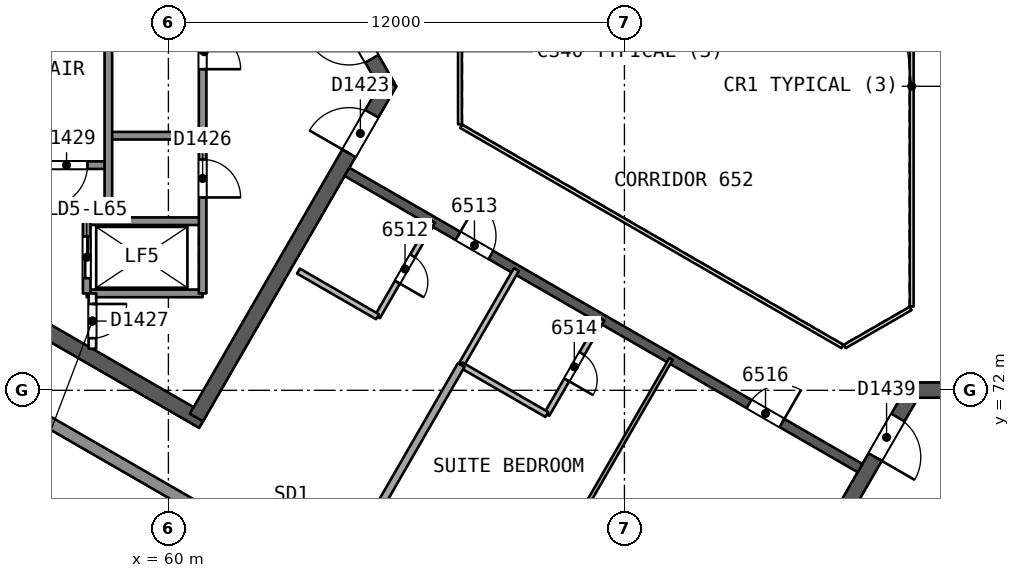
"""IFC4 building model, lengths in metres.
Left out: names, types, materials, properties, quantities, classifications, styles, units other than length and angle.
Written with IfcOpenShell. Run it as: python <this file> out.ifc"""

import sys

from ifc_helpers import new_model, si_unit, direction, frame, frame_2d, origin, place, context, subcontext, project, spatial, rectangle, extrude, element, fill, save


model = new_model("IFC4")
c1 = context("Model", 3, precision=1e-05, world=origin(), true_north=direction((0.0, 1.0)))
c2 = subcontext(c1, "Body", "Model", "MODEL_VIEW")
j1 = project(units=[si_unit("LENGTHUNIT", "METRE"), si_unit("PLANEANGLEUNIT", "RADIAN")], contexts=[c1])
p1 = place(None, origin())
s1 = spatial("IfcSite", under=j1, at=p1, CompositionType="ELEMENT")
p2 = place(p1, origin())
s2 = spatial("IfcBuilding", under=s1, at=p2, CompositionType="ELEMENT")
p3 = place(p2, frame((0.0, 0.0, 266.4)))
s3 = spatial("IfcBuildingStorey", under=s2, at=p3, CompositionType="ELEMENT", Elevation=266.4)
p4 = place(p3, frame((65.769, 80.0, 0.0), z_axis=(0.0, 0.0, 1.0), x_axis=(-0.50000177223, 0.866024380585, 0.0)))
e1 = element("IfcWall", 1, at=p4, inside=s3, PredefinedType="SHEAR", context=c2, shape_type="SweptSolid", body=[
    extrude(rectangle(XDim=10.265, YDim=0.4, at=frame_2d((5.132, 0.0))), origin(), (0.0, 0.0, 1.0), 3.7),
])
p5 = place(p4, frame((0.834, 0.0, 0.0)))
e2 = element("IfcOpeningElement", 2, at=p5, cuts=e1, PredefinedType="OPENING", context=c2, shape_type="SweptSolid", body=[
    extrude(rectangle(XDim=1.2, YDim=2.1, at=frame_2d((0.6, 1.05))), frame((0.0, 0.21, 0.0), z_axis=(0.0, -1.0, 0.0), x_axis=(1.0, 0.0, 0.0)), (0.0, 0.0, 1.0), 0.421),
])
p6 = place(p3, frame((48.597, 78.293, 0.0), z_axis=(0.0, 0.0, 1.0), x_axis=(0.866026024469, -0.499998924941, 0.0)))
e3 = element("IfcWall", 3, at=p6, inside=s3, PredefinedType="SHEAR", context=c2, shape_type="SweptSolid", body=[
    extrude(rectangle(XDim=14.218, YDim=0.4, at=frame_2d((7.109, 0.0))), origin(), (0.0, 0.0, 1.0), 3.7),
])
p7 = place(p3, frame((60.737, 71.284, 0.0), z_axis=(0.0, 0.0, 1.0), x_axis=(0.50000547566, 0.866022242388, 0.0)))
e4 = element("IfcWall", 4, at=p7, inside=s3, PredefinedType="SHEAR", context=c2, shape_type="SweptSolid", body=[
    extrude(rectangle(XDim=10.18, YDim=0.4, at=frame_2d((5.09, 0.0))), origin(), (0.0, 0.0, 1.0), 3.7),
])
p8 = place(p7, frame((8.03, 0.0, 0.0)))
e5 = element("IfcOpeningElement", 5, at=p8, cuts=e4, PredefinedType="OPENING", context=c2, shape_type="SweptSolid", body=[
    extrude(rectangle(XDim=1.2, YDim=2.1, at=frame_2d((0.6, 1.05))), frame((0.0, 0.21, 0.0), z_axis=(0.0, -1.0, 0.0), x_axis=(1.0, 0.0, 0.0)), (0.0, 0.0, 1.0), 0.421),
])
p9 = place(p3, frame((79.615, 72.006, 0.0), z_axis=(0.0, 0.0, 1.0), x_axis=(-0.50000177223, -0.866024380585, 0.0)))
e6 = element("IfcWall", 6, at=p9, inside=s3, PredefinedType="SHEAR", context=c2, shape_type="SweptSolid", body=[
    extrude(rectangle(XDim=10.265, YDim=0.4, at=frame_2d((5.132, 0.0))), origin(), (0.0, 0.0, 1.0), 3.7),
])
p10 = place(p9, frame((0.834, 0.0, 0.0)))
e7 = element("IfcOpeningElement", 7, at=p10, cuts=e6, PredefinedType="OPENING", context=c2, shape_type="SweptSolid", body=[
    extrude(rectangle(XDim=1.2, YDim=2.1, at=frame_2d((0.6, 1.05))), frame((0.0, 0.21, 0.0), z_axis=(0.0, -1.0, 0.0), x_axis=(1.0, 0.0, 0.0)), (0.0, 0.0, 1.0), 0.421),
])
p11 = place(p3, frame((89.68, 72.006, 0.0), z_axis=(0.0, 0.0, 1.0), x_axis=(-1.0, 0.0, 0.0)))
e8 = element("IfcWall", 8, at=p11, inside=s3, PredefinedType="SHEAR", context=c2, shape_type="SweptSolid", body=[
    extrude(rectangle(XDim=10.18, YDim=0.4, at=frame_2d((5.09, 0.0))), origin(), (0.0, 0.0, 1.0), 3.7),
])
p12 = place(p11, frame((8.03, 0.0, 0.0)))
e9 = element("IfcOpeningElement", 9, at=p12, cuts=e8, PredefinedType="OPENING", context=c2, shape_type="SweptSolid", body=[
    extrude(rectangle(XDim=1.2, YDim=2.1, at=frame_2d((0.6, 1.05))), frame((0.0, 0.21, 0.0), z_axis=(0.0, -1.0, 0.0), x_axis=(1.0, 0.0, 0.0)), (0.0, 0.0, 1.0), 0.421),
])
p13 = place(p3, frame((64.7, 77.748, 0.0), z_axis=(0.0, 0.0, 1.0), x_axis=(0.866026492143, -0.499998114903, 0.0)))
e10 = element("IfcWall", 10, at=p13, inside=s3, PredefinedType="SHEAR", context=c2, shape_type="SweptSolid", body=[
    extrude(rectangle(XDim=15.588, YDim=0.25, at=frame_2d((7.794, 0.0))), origin(), (0.0, 0.0, 1.0), 3.3),
])
p14 = place(p13, frame((3.372, 0.0, 0.0)))
e11 = element("IfcOpeningElement", 11, at=p14, cuts=e10, PredefinedType="OPENING", context=c2, shape_type="SweptSolid", body=[
    extrude(rectangle(XDim=1.0, YDim=2.1, at=frame_2d((0.5, 1.05))), frame((0.0, 0.135, 0.0), z_axis=(0.0, -1.0, 0.0), x_axis=(1.0, 0.0, 0.0)), (0.0, 0.0, 1.0), 0.271),
])
p15 = place(p13, frame((12.216, 0.0, 0.0)))
e12 = element("IfcOpeningElement", 12, at=p15, cuts=e10, PredefinedType="OPENING", context=c2, shape_type="SweptSolid", body=[
    extrude(rectangle(XDim=1.0, YDim=2.1, at=frame_2d((0.5, 1.05))), frame((0.0, 0.135, 0.0), z_axis=(0.0, -1.0, 0.0), x_axis=(1.0, 0.0, 0.0)), (0.0, 0.0, 1.0), 0.271),
])
p16 = place(p3, frame((66.952, 76.448, 0.0), z_axis=(0.0, 0.0, 1.0), x_axis=(-0.499987231761, -0.866032775405, 0.0)))
e13 = element("IfcWall", 13, at=p16, inside=s3, PredefinedType="PARTITIONING", context=c2, shape_type="SweptSolid", body=[
    extrude(rectangle(XDim=2.9, YDim=0.15, at=frame_2d((1.45, 0.0))), origin(), (0.0, 0.0, 1.0), 3.3),
])
p17 = place(p16, frame((1.05, 0.0, 0.0)))
e14 = element("IfcOpeningElement", 14, at=p17, cuts=e13, PredefinedType="OPENING", context=c2, shape_type="SweptSolid", body=[
    extrude(rectangle(XDim=0.8, YDim=2.1, at=frame_2d((0.4, 1.05))), frame((0.0, 0.085, 0.0), z_axis=(0.0, -1.0, 0.0), x_axis=(1.0, 0.0, 0.0)), (0.0, 0.0, 1.0), 0.171),
])
p18 = place(p3, frame((65.502, 73.937, 0.0), z_axis=(0.0, 0.0, 1.0), x_axis=(-0.865994240961, 0.500053971709, 0.0)))
e15 = element("IfcWall", 15, at=p18, inside=s3, PredefinedType="PARTITIONING", context=c2, shape_type="SweptSolid", body=[
    extrude(rectangle(XDim=2.401, YDim=0.15, at=frame_2d((1.201, 0.0))), origin(), (0.0, 0.0, 1.0), 3.3),
])
p19 = place(p3, frame((64.416, 66.968, 0.0), z_axis=(0.0, 0.0, 1.0), x_axis=(0.500014792963, 0.866016862895, 0.0)))
e16 = element("IfcWall", 16, at=p19, inside=s3, PredefinedType="PARTITIONING", context=c2, shape_type="SweptSolid", body=[
    extrude(rectangle(XDim=6.578, YDim=0.2, at=frame_2d((3.289, 0.0))), origin(), (0.0, 0.0, 1.0), 3.3),
])
p20 = place(p3, frame((67.705, 72.665, 0.0), z_axis=(0.0, 0.0, 1.0), x_axis=(0.499987231761, 0.866032775405, 0.0)))
e17 = element("IfcWall", 17, at=p20, inside=s3, PredefinedType="PARTITIONING", context=c2, shape_type="SweptSolid", body=[
    extrude(rectangle(XDim=2.9, YDim=0.15, at=frame_2d((1.45, 0.0))), origin(), (0.0, 0.0, 1.0), 3.3),
])
p21 = place(p3, frame((68.486, 64.618, 0.0), z_axis=(0.0, 0.0, 1.0), x_axis=(0.500017514154, 0.866015291747, 0.0)))
e18 = element("IfcWall", 18, at=p21, inside=s3, PredefinedType="PARTITIONING", context=c2, shape_type="SweptSolid", body=[
    extrude(rectangle(XDim=9.478, YDim=0.1, at=frame_2d((4.739, 0.0))), origin(), (0.0, 0.0, 1.0), 3.3),
])
p22 = place(p21, frame((2.69, 0.0, 0.0)))
e19 = element("IfcOpeningElement", 19, at=p22, cuts=e18, PredefinedType="OPENING", context=c2, shape_type="SweptSolid", body=[
    extrude(rectangle(XDim=0.9, YDim=2.1, at=frame_2d((0.45, 1.05))), frame((0.0, 0.061, 0.0), z_axis=(0.0, -1.0, 0.0), x_axis=(1.0, 0.0, 0.0)), (0.0, 0.0, 1.0), 0.121),
])
p23 = place(p3, frame((71.407, 73.876, 0.0), z_axis=(0.0, 0.0, 1.0), x_axis=(-0.499987231761, -0.866032775405, 0.0)))
e20 = element("IfcWall", 20, at=p23, inside=s3, PredefinedType="PARTITIONING", context=c2, shape_type="SweptSolid", body=[
    extrude(rectangle(XDim=2.9, YDim=0.15, at=frame_2d((1.45, 0.0))), origin(), (0.0, 0.0, 1.0), 3.3),
])
p24 = place(p23, frame((1.05, 0.0, 0.0)))
e21 = element("IfcOpeningElement", 21, at=p24, cuts=e20, PredefinedType="OPENING", context=c2, shape_type="SweptSolid", body=[
    extrude(rectangle(XDim=0.8, YDim=2.1, at=frame_2d((0.4, 1.05))), frame((0.0, 0.085, 0.0), z_axis=(0.0, -1.0, 0.0), x_axis=(1.0, 0.0, 0.0)), (0.0, 0.0, 1.0), 0.171),
])
p25 = place(p3, frame((69.957, 71.365, 0.0), z_axis=(0.0, 0.0, 1.0), x_axis=(-0.866021400173, 0.500006934395, 0.0)))
e22 = element("IfcWall", 22, at=p25, inside=s3, PredefinedType="PARTITIONING", context=c2, shape_type="SweptSolid", body=[
    extrude(rectangle(XDim=2.6, YDim=0.15, at=frame_2d((1.3, 0.0))), origin(), (0.0, 0.0, 1.0), 3.3),
])
p26 = place(p3, frame((87.466, 53.488, 0.0), z_axis=(0.0, 0.0, 1.0), x_axis=(-0.866024833565, 0.500000987648, 0.0)))
e23 = element("IfcWall", 23, at=p26, inside=s3, PredefinedType="SOLIDWALL", context=c2, shape_type="SweptSolid", body=[
    extrude(rectangle(XDim=48.104, YDim=0.3, at=frame_2d((24.052, 0.0))), origin(), (0.0, 0.0, 1.0), 3.3),
])
p27 = place(p26, frame((23.152, 0.0, 0.0)))
e24 = element("IfcOpeningElement", 24, at=p27, cuts=e23, PredefinedType="OPENING", context=c2, shape_type="SweptSolid", body=[
    extrude(rectangle(XDim=2.4, YDim=2.4, at=frame_2d((1.2, 1.2))), frame((0.0, 0.161, 0.0), z_axis=(0.0, -1.0, 0.0), x_axis=(1.0, 0.0, 0.0)), (0.0, 0.0, 1.0), 0.321),
])
p28 = place(p26, frame((17.93, 0.0, 0.0)))
e25 = element("IfcOpeningElement", 25, at=p28, cuts=e23, PredefinedType="OPENING", context=c2, shape_type="SweptSolid", body=[
    extrude(rectangle(XDim=2.4, YDim=2.4, at=frame_2d((1.2, 1.2))), frame((0.0, 0.161, 0.0), z_axis=(0.0, -1.0, 0.0), x_axis=(1.0, 0.0, 0.0)), (0.0, 0.0, 1.0), 0.321),
])
p29 = place(p26, frame((28.074, 0.0, 0.0)))
e26 = element("IfcOpeningElement", 26, at=p29, cuts=e23, PredefinedType="OPENING", context=c2, shape_type="SweptSolid", body=[
    extrude(rectangle(XDim=2.4, YDim=2.4, at=frame_2d((1.2, 1.2))), frame((0.0, 0.161, 0.0), z_axis=(0.0, -1.0, 0.0), x_axis=(1.0, 0.0, 0.0)), (0.0, 0.0, 1.0), 0.321),
])
p30 = place(p3, frame((60.9, 78.7, 0.0), z_axis=(0.0, 0.0, 1.0), x_axis=(-1.0, 0.0, 0.0)))
e27 = element("IfcWall", 27, at=p30, inside=s3, PredefinedType="SOLIDWALL", context=c2, shape_type="SweptSolid", body=[
    extrude(rectangle(XDim=2.48, YDim=0.2, at=frame_2d((1.24, 0.0))), origin(), (0.0, 0.0, 1.0), 3.3),
])
p31 = place(p3, frame((58.42, 77.925, 0.0), z_axis=(0.0, 0.0, 1.0), x_axis=(-1.0, 0.0, 0.0)))
e28 = element("IfcWall", 28, at=p31, inside=s3, PredefinedType="SOLIDWALL", context=c2, shape_type="SweptSolid", body=[
    extrude(rectangle(XDim=7.7, YDim=0.2, at=frame_2d((3.85, 0.0))), origin(), (0.0, 0.0, 1.0), 3.3),
])
p32 = place(p31, frame((0.55, 0.0, 0.0)))
e29 = element("IfcOpeningElement", 29, at=p32, cuts=e28, PredefinedType="OPENING", context=c2, shape_type="SweptSolid", body=[
    extrude(rectangle(XDim=1.1, YDim=2.1, at=frame_2d((0.55, 1.05))), frame((0.0, 0.11, 0.0), z_axis=(0.0, -1.0, 0.0), x_axis=(1.0, 0.0, 0.0)), (0.0, 0.0, 1.0), 0.221),
])
for number, where, z_axis, x_axis in (
    (30, (60.9, 76.45, 0.0), (0.0, 0.0, 1.0), (-1.0, 0.0, 0.0)),
    (31, (60.9, 74.55, 0.0), (0.0, 0.0, 1.0), (-1.0, 0.0, 0.0)),
):
    element("IfcWall", number, at=place(p3, frame(where, z_axis=z_axis, x_axis=x_axis)), inside=s3, PredefinedType="SOLIDWALL", context=c2, shape_type="SweptSolid", body=[
        extrude(rectangle(XDim=3.05, YDim=0.2, at=frame_2d((1.525, 0.0))), origin(), (0.0, 0.0, 1.0), 3.3),
    ])
p33 = place(p3, frame((60.9, 85.45, 0.0), z_axis=(0.0, 0.0, 1.0), x_axis=(0.0, -1.0, 0.0)))
e32 = element("IfcWall", 32, at=p33, inside=s3, PredefinedType="SOLIDWALL", context=c2, shape_type="SweptSolid", body=[
    extrude(rectangle(XDim=10.9, YDim=0.2, at=frame_2d((5.45, 0.0))), origin(), (0.0, 0.0, 1.0), 3.3),
])
p34 = place(p33, frame((0.625, 0.0, 0.0)))
e33 = element("IfcOpeningElement", 33, at=p34, cuts=e32, PredefinedType="OPENING", context=c2, shape_type="SweptSolid", body=[
    extrude(rectangle(XDim=1.0, YDim=2.1, at=frame_2d((0.5, 1.05))), frame((0.0, 0.11, 0.0), z_axis=(0.0, -1.0, 0.0), x_axis=(1.0, 0.0, 0.0)), (0.0, 0.0, 1.0), 0.221),
])
p35 = place(p33, frame((4.0, 0.0, 0.0)))
e34 = element("IfcOpeningElement", 34, at=p35, cuts=e32, PredefinedType="OPENING", context=c2, shape_type="SweptSolid", body=[
    extrude(rectangle(XDim=1.0, YDim=2.1, at=frame_2d((0.5, 1.05))), frame((0.0, 0.11, 0.0), z_axis=(0.0, -1.0, 0.0), x_axis=(1.0, 0.0, 0.0)), (0.0, 0.0, 1.0), 0.221),
])
p36 = place(p33, frame((7.375, 0.0, 0.0)))
e35 = element("IfcOpeningElement", 35, at=p36, cuts=e32, PredefinedType="OPENING", context=c2, shape_type="SweptSolid", body=[
    extrude(rectangle(XDim=1.0, YDim=2.1, at=frame_2d((0.5, 1.05))), frame((0.0, 0.11, 0.0), z_axis=(0.0, -1.0, 0.0), x_axis=(1.0, 0.0, 0.0)), (0.0, 0.0, 1.0), 0.221),
])
p37 = place(p3, frame((58.42, 87.148, 0.0), z_axis=(0.0, 0.0, 1.0), x_axis=(0.0, -1.0, 0.0)))
e36 = element("IfcWall", 36, at=p37, inside=s3, PredefinedType="SOLIDWALL", context=c2, shape_type="SweptSolid", body=[
    extrude(rectangle(XDim=10.698, YDim=0.2, at=frame_2d((5.349, 0.0))), origin(), (0.0, 0.0, 1.0), 3.3),
])
p38 = place(p37, frame((0.399, 0.0, 0.0)))
e37 = element("IfcOpeningElement", 37, at=p38, cuts=e36, PredefinedType="OPENING", context=c2, shape_type="SweptSolid", body=[
    extrude(rectangle(XDim=0.9, YDim=2.1, at=frame_2d((0.45, 1.05))), frame((0.0, 0.11, 0.0), z_axis=(0.0, -1.0, 0.0), x_axis=(1.0, 0.0, 0.0)), (0.0, 0.0, 1.0), 0.221),
])
p39 = place(p3, frame((58.0, 74.55, 0.0), z_axis=(0.0, 0.0, 1.0), x_axis=(0.0, -1.0, 0.0)))
e38 = element("IfcWall", 38, at=p39, inside=s3, PredefinedType="PARTITIONING", context=c2, shape_type="SweptSolid", body=[
    extrude(rectangle(XDim=1.455, YDim=0.2, at=frame_2d((0.728, 0.0))), origin(), (0.0, 0.0, 1.0), 3.3),
])
p40 = place(p39, frame((0.278, 0.0, 0.0)))
e39 = element("IfcOpeningElement", 39, at=p40, cuts=e38, PredefinedType="OPENING", context=c2, shape_type="SweptSolid", body=[
    extrude(rectangle(XDim=0.9, YDim=2.1, at=frame_2d((0.45, 1.05))), frame((0.0, 0.11, 0.0), z_axis=(0.0, -1.0, 0.0), x_axis=(1.0, 0.0, 0.0)), (0.0, 0.0, 1.0), 0.221),
])
p41 = place(p3, frame((57.85, 76.45, 0.0), z_axis=(0.0, 0.0, 1.0), x_axis=(0.0, -1.0, 0.0)))
e40 = element("IfcWall", 40, at=p41, inside=s3, PredefinedType="SOLIDWALL", context=c2, shape_type="SweptSolid", body=[
    extrude(rectangle(XDim=1.9, YDim=0.2, at=frame_2d((0.95, 0.0))), origin(), (0.0, 0.0, 1.0), 3.3),
])
p42 = place(p41, frame((0.4, 0.0, 0.0)))
e41 = element("IfcOpeningElement", 41, at=p42, cuts=e40, PredefinedType="OPENING", context=c2, shape_type="SweptSolid", body=[
    extrude(rectangle(XDim=1.1, YDim=2.1, at=frame_2d((0.55, 1.05))), frame((0.0, 0.11, 0.0), z_axis=(0.0, -1.0, 0.0), x_axis=(1.0, 0.0, 0.0)), (0.0, 0.0, 1.0), 0.221),
])
p43 = place(p3, frame((77.135, 64.952, 0.0), z_axis=(0.0, 0.0, 1.0), x_axis=(0.866031916153, 0.499988720078, 0.0)))
e42 = element("IfcWall", 42, at=p43, inside=s3, PredefinedType="SOLIDWALL", context=c2, shape_type="SweptSolid", body=[
    extrude(rectangle(XDim=11.35, YDim=0.2, at=frame_2d((5.675, 0.0))), origin(), (0.0, 0.0, 1.0), 3.3),
])
p44 = place(p43, frame((2.875, 0.0, 0.0)))
e43 = element("IfcOpeningElement", 43, at=p44, cuts=e42, PredefinedType="OPENING", context=c2, shape_type="SweptSolid", body=[
    extrude(rectangle(XDim=1.1, YDim=2.1, at=frame_2d((0.55, 1.05))), frame((0.0, 0.11, 0.0), z_axis=(0.0, -1.0, 0.0), x_axis=(1.0, 0.0, 0.0)), (0.0, 0.0, 1.0), 0.221),
])
p45 = place(p43, frame((5.125, 0.0, 0.0)))
e44 = element("IfcOpeningElement", 44, at=p45, cuts=e42, PredefinedType="OPENING", context=c2, shape_type="SweptSolid", body=[
    extrude(rectangle(XDim=1.1, YDim=2.1, at=frame_2d((0.55, 1.05))), frame((0.0, 0.11, 0.0), z_axis=(0.0, -1.0, 0.0), x_axis=(1.0, 0.0, 0.0)), (0.0, 0.0, 1.0), 0.221),
])
p46 = place(p43, frame((7.375, 0.0, 0.0)))
e45 = element("IfcOpeningElement", 45, at=p46, cuts=e42, PredefinedType="OPENING", context=c2, shape_type="SweptSolid", body=[
    extrude(rectangle(XDim=1.1, YDim=2.1, at=frame_2d((0.55, 1.05))), frame((0.0, 0.11, 0.0), z_axis=(0.0, -1.0, 0.0), x_axis=(1.0, 0.0, 0.0)), (0.0, 0.0, 1.0), 0.221),
])
p47 = place(p3, frame((79.56, 74.206, 0.0), z_axis=(0.0, 0.0, 1.0), x_axis=(0.0, 1.0, 0.0)))
e46 = element("IfcWall", 46, at=p47, inside=s3, PredefinedType="PARTITIONING", context=c2, shape_type="SweptSolid", body=[
    extrude(rectangle(XDim=11.588, YDim=0.1, at=frame_2d((5.794, 0.0))), origin(), (0.0, 0.0, 1.0), 3.3),
])
p48 = place(p3, frame((67.672, 81.0, 0.0), z_axis=(0.0, 0.0, 1.0), x_axis=(0.0, -1.0, 0.0)))
e47 = element("IfcWall", 47, at=p48, inside=s3, PredefinedType="PARTITIONING", context=c2, shape_type="SweptSolid", body=[
    extrude(rectangle(XDim=2.0, YDim=0.1, at=frame_2d((1.0, 0.0))), origin(), (0.0, 0.0, 1.0), 3.3),
])
p49 = place(p3, frame((67.702, 78.948, 0.0), z_axis=(0.0, 0.0, 1.0), x_axis=(0.866026658274, -0.499997827154, 0.0)))
e48 = element("IfcWall", 48, at=p49, inside=s3, PredefinedType="PARTITIONING", context=c2, shape_type="SweptSolid", body=[
    extrude(rectangle(XDim=11.588, YDim=0.1, at=frame_2d((5.794, 0.0))), origin(), (0.0, 0.0, 1.0), 3.3),
])
p50 = place(p3, frame((77.798, 73.154, 0.0), z_axis=(0.0, 0.0, 1.0), x_axis=(0.866041268327, 0.499972520799, 0.0)))
e49 = element("IfcWall", 49, at=p50, inside=s3, PredefinedType="PARTITIONING", context=c2, shape_type="SweptSolid", body=[
    extrude(rectangle(XDim=2.0, YDim=0.1, at=frame_2d((1.0, 0.0))), origin(), (0.0, 0.0, 1.0), 3.3),
])
p51 = place(p17, origin())
e50 = element("IfcDoor", 50, at=p51, inside=s3, OperationType="SINGLE_SWING_RIGHT", PredefinedType="NOTDEFINED", context=c2, shape_type="SweptSolid", body=[
    extrude(rectangle(XDim=0.8, YDim=2.1, at=frame_2d((0.4, 1.05))), frame((0.0, 0.025, 0.0), z_axis=(0.0, -1.0, 0.0), x_axis=(1.0, 0.0, 0.0)), (0.0, 0.0, 1.0), 0.05),
])
fill(e14, e50)
p52 = place(p14, origin())
e51 = element("IfcDoor", 51, at=p52, inside=s3, OperationType="SINGLE_SWING_LEFT", PredefinedType="NOTDEFINED", context=c2, shape_type="SweptSolid", body=[
    extrude(rectangle(XDim=1.0, YDim=2.1, at=frame_2d((0.5, 1.05))), frame((0.0, 0.025, 0.0), z_axis=(0.0, -1.0, 0.0), x_axis=(1.0, 0.0, 0.0)), (0.0, 0.0, 1.0), 0.05),
])
fill(e11, e51)
p53 = place(p24, origin())
e52 = element("IfcDoor", 52, at=p53, inside=s3, OperationType="SINGLE_SWING_RIGHT", PredefinedType="NOTDEFINED", context=c2, shape_type="SweptSolid", body=[
    extrude(rectangle(XDim=0.8, YDim=2.1, at=frame_2d((0.4, 1.05))), frame((0.0, 0.025, 0.0), z_axis=(0.0, -1.0, 0.0), x_axis=(1.0, 0.0, 0.0)), (0.0, 0.0, 1.0), 0.05),
])
fill(e21, e52)
p54 = place(p15, origin())
e53 = element("IfcDoor", 53, at=p54, inside=s3, OperationType="SINGLE_SWING_RIGHT", PredefinedType="NOTDEFINED", context=c2, shape_type="SweptSolid", body=[
    extrude(rectangle(XDim=1.0, YDim=2.1, at=frame_2d((0.5, 1.05))), frame((0.0, 0.025, 0.0), z_axis=(0.0, -1.0, 0.0), x_axis=(1.0, 0.0, 0.0)), (0.0, 0.0, 1.0), 0.05),
])
fill(e12, e53)
p55 = place(p5, origin())
e54 = element("IfcDoor", 54, at=p55, inside=s3, OperationType="SINGLE_SWING_RIGHT", PredefinedType="NOTDEFINED", context=c2, shape_type="SweptSolid", body=[
    extrude(rectangle(XDim=1.2, YDim=2.1, at=frame_2d((0.6, 1.05))), frame((0.0, 0.025, 0.0), z_axis=(0.0, -1.0, 0.0), x_axis=(1.0, 0.0, 0.0)), (0.0, 0.0, 1.0), 0.05),
])
fill(e2, e54)
p56 = place(p8, origin())
e55 = element("IfcDoor", 55, at=p56, inside=s3, OperationType="SINGLE_SWING_LEFT", PredefinedType="NOTDEFINED", context=c2, shape_type="SweptSolid", body=[
    extrude(rectangle(XDim=1.2, YDim=2.1, at=frame_2d((0.6, 1.05))), frame((0.0, 0.025, 0.0), z_axis=(0.0, -1.0, 0.0), x_axis=(1.0, 0.0, 0.0)), (0.0, 0.0, 1.0), 0.05),
])
fill(e5, e55)
p57 = place(p42, origin())
e56 = element("IfcDoor", 56, at=p57, inside=s3, OperationType="SLIDING_TO_RIGHT", PredefinedType="NOTDEFINED", context=c2, shape_type="SweptSolid", body=[
    extrude(rectangle(XDim=1.1, YDim=2.1, at=frame_2d((0.55, 1.05))), frame((0.0, 0.025, 0.0), z_axis=(0.0, -1.0, 0.0), x_axis=(1.0, 0.0, 0.0)), (0.0, 0.0, 1.0), 0.05),
])
fill(e41, e56)
p58 = place(p35, origin())
e57 = element("IfcDoor", 57, at=p58, inside=s3, OperationType="SINGLE_SWING_RIGHT", PredefinedType="NOTDEFINED", context=c2, shape_type="SweptSolid", body=[
    extrude(rectangle(XDim=1.0, YDim=2.1, at=frame_2d((0.5, 1.05))), frame((0.0, 0.025, 0.0), z_axis=(0.0, -1.0, 0.0), x_axis=(1.0, 0.0, 0.0)), (0.0, 0.0, 1.0), 0.05),
])
fill(e34, e57)
p59 = place(p36, origin())
e58 = element("IfcDoor", 58, at=p59, inside=s3, OperationType="SINGLE_SWING_RIGHT", PredefinedType="NOTDEFINED", context=c2, shape_type="SweptSolid", body=[
    extrude(rectangle(XDim=1.0, YDim=2.1, at=frame_2d((0.5, 1.05))), frame((0.0, 0.025, 0.0), z_axis=(0.0, -1.0, 0.0), x_axis=(1.0, 0.0, 0.0)), (0.0, 0.0, 1.0), 0.05),
])
fill(e35, e58)
p60 = place(p40, origin())
e59 = element("IfcDoor", 59, at=p60, inside=s3, OperationType="SINGLE_SWING_LEFT", PredefinedType="NOTDEFINED", context=c2, shape_type="SweptSolid", body=[
    extrude(rectangle(XDim=0.9, YDim=2.1, at=frame_2d((0.45, 1.05))), frame((0.0, 0.025, 0.0), z_axis=(0.0, -1.0, 0.0), x_axis=(1.0, 0.0, 0.0)), (0.0, 0.0, 1.0), 0.05),
])
fill(e39, e59)
p61 = place(p32, origin())
e60 = element("IfcDoor", 60, at=p61, inside=s3, OperationType="SINGLE_SWING_RIGHT", PredefinedType="NOTDEFINED", context=c2, shape_type="SweptSolid", body=[
    extrude(rectangle(XDim=1.1, YDim=2.1, at=frame_2d((0.55, 1.05))), frame((0.0, 0.025, 0.0), z_axis=(0.0, -1.0, 0.0), x_axis=(1.0, 0.0, 0.0)), (0.0, 0.0, 1.0), 0.05),
])
fill(e29, e60)
p62 = place(p10, origin())
e61 = element("IfcDoor", 61, at=p62, inside=s3, OperationType="SINGLE_SWING_RIGHT", PredefinedType="NOTDEFINED", context=c2, shape_type="SweptSolid", body=[
    extrude(rectangle(XDim=1.2, YDim=2.1, at=frame_2d((0.6, 1.05))), frame((0.0, 0.025, 0.0), z_axis=(0.0, -1.0, 0.0), x_axis=(1.0, 0.0, 0.0)), (0.0, 0.0, 1.0), 0.05),
])
fill(e7, e61)
save(model, sys.argv[1])
